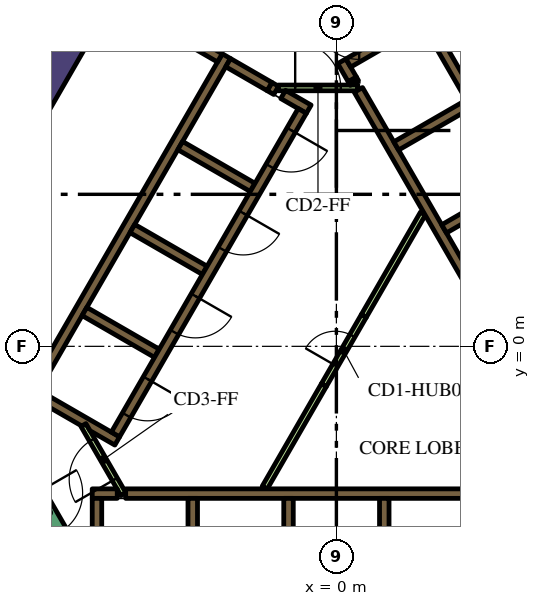
"""IFC4 building model, lengths in metres.
Left out: names, types, materials, properties, quantities, classifications, styles, units other than length and angle.
Written with IfcOpenShell. Run it as: python <this file> out.ifc"""

import sys

from ifc_helpers import new_model, si_unit, direction, frame, frame_2d, origin, place, context, subcontext, project, spatial, polyline, rectangle, outline, extrude, element, fill, save


model = new_model("IFC4")
c1 = context("Model", 3, precision=1e-05, world=origin(), true_north=direction((0.0, 1.0)))
c2 = subcontext(c1, "Body", "Model", "MODEL_VIEW")
j1 = project(units=[si_unit("LENGTHUNIT", "METRE"), si_unit("PLANEANGLEUNIT", "RADIAN")], contexts=[c1])
p1 = place(None, origin())
s1 = spatial("IfcSite", under=j1, at=p1, CompositionType="ELEMENT")
p2 = place(p1, origin())
s2 = spatial("IfcBuilding", under=s1, at=p2, CompositionType="ELEMENT")
p3 = place(p2, frame((0.0, 0.0, 162.6)))
s3 = spatial("IfcBuildingStorey", under=s2, at=p3, CompositionType="ELEMENT", Elevation=162.6)
p4 = place(p3, frame((8.279, 5.761, 0.0), z_axis=(0.0, 0.0, 1.0), x_axis=(-0.500010359015, 0.866019422922, 0.0)))
e1 = element("IfcWall", 1, at=p4, inside=s3, PredefinedType="SOLIDWALL", context=c2, shape_type="SweptSolid", body=[
    extrude(rectangle(XDim=12.528, YDim=0.8, at=frame_2d((6.264, 0.0))), origin(), (0.0, 0.0, 1.0), 4.2),
])
p5 = place(p3, frame((-12.668, -1.842, 0.0), z_axis=(0.0, 0.0, 1.0), x_axis=(0.500003640647, 0.866023301845, 0.0)))
e2 = element("IfcWall", 2, at=p5, inside=s3, PredefinedType="SOLIDWALL", context=c2, shape_type="SweptSolid", body=[
    extrude(rectangle(XDim=15.858, YDim=0.8, at=frame_2d((7.929, 0.0))), origin(), (0.0, 0.0, 1.0), 4.2),
])
p6 = place(p3, frame((-5.545, -3.875, 0.0), z_axis=(0.0, 0.0, 1.0), x_axis=(1.0, 0.0, 0.0)))
e3 = element("IfcWall", 3, at=p6, inside=s3, PredefinedType="SOLIDWALL", context=c2, shape_type="SweptSolid", body=[
    extrude(rectangle(XDim=11.97, YDim=0.25, at=frame_2d((5.985, 0.0))), origin(), (0.0, 0.0, 1.0), 4.2),
])
p7 = place(p3, frame((-6.425, -3.875, 0.0), z_axis=(0.0, 0.0, 1.0), x_axis=(1.0, 0.0, 0.0)))
e4 = element("IfcWall", 4, at=p7, inside=s3, PredefinedType="SOLIDWALL", context=c2, shape_type="SweptSolid", body=[
    extrude(rectangle(XDim=0.658, YDim=0.25, at=frame_2d((0.329, 0.0))), origin(), (0.0, 0.0, 1.0), 4.2),
])
for number, where, z_axis, x_axis in (
    (5, (1.26, -4.0, 0.0), (0.0, 0.0, 1.0), (0.0, -1.0, 0.0)),
    (6, (-1.26, -4.0, 0.0), (0.0, 0.0, 1.0), (0.0, -1.0, 0.0)),
    (7, (-3.78, -4.0, 0.0), (0.0, 0.0, 1.0), (0.0, -1.0, 0.0)),
):
    element("IfcWall", number, at=place(p3, frame(where, z_axis=z_axis, x_axis=x_axis)), inside=s3, PredefinedType="SOLIDWALL", context=c2, shape_type="SweptSolid", body=[
        extrude(rectangle(XDim=2.2, YDim=0.25, at=frame_2d((1.1, 0.0))), origin(), (0.0, 0.0, 1.0), 4.2),
    ])
p8 = place(p3, frame((-6.3, -7.125, 0.0), z_axis=(0.0, 0.0, 1.0), x_axis=(0.0, 1.0, 0.0)))
e8 = element("IfcWall", 8, at=p8, inside=s3, PredefinedType="SOLIDWALL", context=c2, shape_type="SweptSolid", body=[
    extrude(rectangle(XDim=3.125, YDim=0.25, at=frame_2d((1.562, 0.0))), origin(), (0.0, 0.0, 1.0), 4.2),
])
p9 = place(p3, frame((0.473, 6.93, 0.0), z_axis=(0.0, 0.0, 1.0), x_axis=(-0.49972245349, 0.866185586049, 0.0)))
e9 = element("IfcWall", 9, at=p9, inside=s3, PredefinedType="SOLIDWALL", context=c2, shape_type="SweptSolid", body=[
    extrude(rectangle(XDim=0.11, YDim=0.25, at=frame_2d((0.055, 0.0))), origin(), (0.0, 0.0, 1.0), 4.2),
])
p10 = place(p3, frame((6.568, -3.627, 0.0), z_axis=(0.0, 0.0, 1.0), x_axis=(-0.499999455981, 0.866025717874, 0.0)))
e10 = element("IfcWall", 10, at=p10, inside=s3, PredefinedType="SOLIDWALL", context=c2, shape_type="SweptSolid", body=[
    extrude(rectangle(XDim=11.978, YDim=0.25, at=frame_2d((5.989, 0.0))), origin(), (0.0, 0.0, 1.0), 4.2),
])
p11 = place(p3, frame((0.417, 7.027, 0.0), z_axis=(0.0, 0.0, 1.0), x_axis=(-0.500210807569, 0.865903659763, 0.0)))
e11 = element("IfcWall", 11, at=p11, inside=s3, PredefinedType="SOLIDWALL", context=c2, shape_type="SweptSolid", body=[
    extrude(rectangle(XDim=0.548, YDim=0.25, at=frame_2d((0.274, 0.0))), origin(), (0.0, 0.0, 1.0), 4.2),
])
p12 = place(p3, frame((3.1, 9.064, 0.0), z_axis=(0.0, 0.0, 1.0), x_axis=(-0.866030133475, -0.499991807846, 0.0)))
e12 = element("IfcWall", 12, at=p12, inside=s3, PredefinedType="SOLIDWALL", context=c2, shape_type="SweptSolid", body=[
    extrude(rectangle(XDim=3.217, YDim=0.25, at=frame_2d((1.608, 0.0))), origin(), (0.0, 0.0, 1.0), 4.2),
])
p13 = place(p3, frame((1.574, 5.274, 0.0), z_axis=(0.0, 0.0, 1.0), x_axis=(0.866028486751, 0.499994660107, 0.0)))
e13 = element("IfcWall", 13, at=p13, inside=s3, PredefinedType="SOLIDWALL", context=c2, shape_type="SweptSolid", body=[
    extrude(rectangle(XDim=2.2, YDim=0.25, at=frame_2d((1.1, 0.0))), origin(), (0.0, 0.0, 1.0), 4.2),
])
p14 = place(p3, frame((2.834, 3.091, 0.0), z_axis=(0.0, 0.0, 1.0), x_axis=(0.866008176907, 0.50002983664, 0.0)))
e14 = element("IfcWall", 14, at=p14, inside=s3, PredefinedType="SOLIDWALL", context=c2, shape_type="SweptSolid", body=[
    extrude(rectangle(XDim=2.2, YDim=0.25, at=frame_2d((1.1, 0.0))), origin(), (0.0, 0.0, 1.0), 4.2),
])
p15 = place(p3, frame((-8.06, -1.311, 0.0), z_axis=(0.0, 0.0, 1.0), x_axis=(0.50000273126, 0.866023826885, 0.0)))
e15 = element("IfcWall", 15, at=p15, inside=s3, PredefinedType="SOLIDWALL", context=c2, shape_type="SweptSolid", body=[
    extrude(rectangle(XDim=10.33, YDim=0.25, at=frame_2d((5.165, 0.0))), origin(), (0.0, 0.0, 1.0), 4.2),
])
p16 = place(p3, frame((-1.758, 6.835, 0.0), z_axis=(0.0, 0.0, 1.0), x_axis=(0.865982457891, -0.500074377092, 0.0)))
e16 = element("IfcWall", 16, at=p16, inside=s3, PredefinedType="SOLIDWALL", context=c2, shape_type="SweptSolid", body=[
    extrude(rectangle(XDim=0.2, YDim=0.25, at=frame_2d((0.1, 0.0))), origin(), (0.0, 0.0, 1.0), 4.2),
])
p17 = place(p3, frame((-1.76, 6.836, 0.0), z_axis=(0.0, 0.0, 1.0), x_axis=(-0.865952863304, 0.500125622755, 0.0)))
e17 = element("IfcWall", 17, at=p17, inside=s3, PredefinedType="SOLIDWALL", context=c2, shape_type="SweptSolid", body=[
    extrude(rectangle(XDim=1.258, YDim=0.25, at=frame_2d((0.629, 0.0))), origin(), (0.0, 0.0, 1.0), 4.2),
])
p18 = place(p3, frame((-0.728, 6.24, 0.0), z_axis=(0.0, 0.0, 1.0), x_axis=(-0.865955664968, 0.500120771724, 0.0)))
e18 = element("IfcWall", 18, at=p18, inside=s3, PredefinedType="SOLIDWALL", context=c2, shape_type="SweptSolid", body=[
    extrude(rectangle(XDim=0.778, YDim=0.25, at=frame_2d((0.389, 0.0))), origin(), (0.0, 0.0, 1.0), 4.2),
])
for number, where, z_axis, x_axis in (
    (19, (-2.204, 4.182, 0.0), (0.0, 0.0, 1.0), (-0.866, 0.5, 0.0)),
    (20, (-5.369, 3.1, 0.0), (0.0, 0.0, 1.0), (0.866, -0.5, 0.0)),
    (21, (-4.724, -0.182, 0.0), (0.0, 0.0, 1.0), (-0.866, 0.5, 0.0)),
):
    element("IfcWall", number, at=place(p3, frame(where, z_axis=z_axis, x_axis=x_axis)), inside=s3, PredefinedType="SOLIDWALL", context=c2, shape_type="SweptSolid", body=[
        extrude(rectangle(XDim=2.2, YDim=0.25, at=frame_2d((1.1, 0.0))), origin(), (0.0, 0.0, 1.0), 4.2),
    ])
p19 = place(p3, origin())
e22 = element("IfcWall", 22, at=p19, inside=s3, PredefinedType="SOLIDWALL", context=c2, shape_type="SweptSolid", body=[
    extrude(outline(polyline([(-5.922, -2.257), (-5.922, -2.257), (-5.705, -2.382), (-5.83, -2.598), (-6.483, -2.221), (-6.591, -2.033), (-6.591, -2.033), (-6.7, -2.096), (-7.952, -1.373), (-7.827, -1.156), (-5.922, -2.257)])), origin(), (0.0, 0.0, 1.0), 4.2),
])
p20 = place(p3, frame((-3.066, 7.59, 0.0), z_axis=(0.0, 0.0, 1.0), x_axis=(-0.866081358704, 0.49990307071, 0.0)))
e23 = element("IfcWall", 23, at=p20, inside=s3, PredefinedType="SOLIDWALL", context=c2, shape_type="SweptSolid", body=[
    extrude(rectangle(XDim=0.858, YDim=0.25, at=frame_2d((0.429, 0.0))), origin(), (0.0, 0.0, 1.0), 4.2),
])
p21 = place(p3, frame((-1.887, -3.718, 0.0), z_axis=(0.0, 0.0, 1.0), x_axis=(0.500043732237, 0.866000153493, 0.0)))
e24 = element("IfcWall", 24, at=p21, inside=s3, PredefinedType="PARTITIONING", context=c2, shape_type="SweptSolid", body=[
    extrude(rectangle(XDim=3.114, YDim=0.15, at=frame_2d((1.557, 0.0))), origin(), (0.0, 0.0, 1.0), 3.15),
])
p22 = place(p3, frame((0.72, 0.797, 0.0), z_axis=(0.0, 0.0, 1.0), x_axis=(0.499984921984, 0.866034108906, 0.0)))
e25 = element("IfcWall", 25, at=p22, inside=s3, PredefinedType="PARTITIONING", context=c2, shape_type="SweptSolid", body=[
    extrude(rectangle(XDim=3.113, YDim=0.15, at=frame_2d((1.557, 0.0))), origin(), (0.0, 0.0, 1.0), 3.15),
])
p23 = place(p3, frame((8.565, -2.185, 0.0), z_axis=(0.0, 0.0, 1.0), x_axis=(-0.499997954832, 0.866026584559, 0.0)))
e26 = element("IfcWall", 26, at=p23, inside=s3, PredefinedType="SOLIDWALL", context=c2, shape_type="SweptSolid", body=[
    extrude(rectangle(XDim=12.35, YDim=0.25, at=frame_2d((6.175, 0.0))), origin(), (0.0, 0.0, 1.0), 4.2),
])
p24 = place(p23, frame((0.585, 0.0, 0.0)))
e27 = element("IfcOpeningElement", 27, at=p24, cuts=e26, PredefinedType="OPENING", context=c2, shape_type="SweptSolid", body=[
    extrude(rectangle(XDim=1.1, YDim=2.1, at=frame_2d((0.55, 1.05))), frame((0.0, 0.135, 0.0), z_axis=(0.0, -1.0, 0.0), x_axis=(1.0, 0.0, 0.0)), (0.0, 0.0, 1.0), 0.27),
])
p25 = place(p3, frame((-0.898, 6.194, 0.0), z_axis=(0.0, 0.0, 1.0), x_axis=(-0.499996202215, -0.866027596426, 0.0)))
e28 = element("IfcWall", 28, at=p25, inside=s3, PredefinedType="SOLIDWALL", context=c2, shape_type="SweptSolid", body=[
    extrude(rectangle(XDim=9.83, YDim=0.25, at=frame_2d((4.915, 0.0))), origin(), (0.0, 0.0, 1.0), 4.2),
])
p26 = place(p25, frame((0.585, 0.0, 0.0)))
e29 = element("IfcOpeningElement", 29, at=p26, cuts=e28, PredefinedType="OPENING", context=c2, shape_type="SweptSolid", body=[
    extrude(rectangle(XDim=1.1, YDim=2.1, at=frame_2d((0.55, 1.05))), frame((0.0, 0.135, 0.0), z_axis=(0.0, -1.0, 0.0), x_axis=(1.0, 0.0, 0.0)), (0.0, 0.0, 1.0), 0.27),
])
p27 = place(p25, frame((3.105, 0.0, 0.0)))
e30 = element("IfcOpeningElement", 30, at=p27, cuts=e28, PredefinedType="OPENING", context=c2, shape_type="SweptSolid", body=[
    extrude(rectangle(XDim=1.1, YDim=2.1, at=frame_2d((0.55, 1.05))), frame((0.0, 0.135, 0.0), z_axis=(0.0, -1.0, 0.0), x_axis=(1.0, 0.0, 0.0)), (0.0, 0.0, 1.0), 0.27),
])
p28 = place(p25, frame((5.625, 0.0, 0.0)))
e31 = element("IfcOpeningElement", 31, at=p28, cuts=e28, PredefinedType="OPENING", context=c2, shape_type="SweptSolid", body=[
    extrude(rectangle(XDim=1.1, YDim=2.1, at=frame_2d((0.55, 1.05))), frame((0.0, 0.135, 0.0), z_axis=(0.0, -1.0, 0.0), x_axis=(1.0, 0.0, 0.0)), (0.0, 0.0, 1.0), 0.27),
])
p29 = place(p25, frame((8.145, 0.0, 0.0)))
e32 = element("IfcOpeningElement", 32, at=p29, cuts=e28, PredefinedType="OPENING", context=c2, shape_type="SweptSolid", body=[
    extrude(rectangle(XDim=1.1, YDim=2.1, at=frame_2d((0.55, 1.05))), frame((0.0, 0.135, 0.0), z_axis=(0.0, -1.0, 0.0), x_axis=(1.0, 0.0, 0.0)), (0.0, 0.0, 1.0), 0.27),
])
p30 = place(p3, frame((-8.103, -3.466, 0.0), z_axis=(0.0, 0.0, 1.0), x_axis=(0.500078061341, -0.865980330357, 0.0)))
e33 = element("IfcWall", 33, at=p30, inside=s3, PredefinedType="SOLIDWALL", context=c2, shape_type="SweptSolid", body=[
    extrude(rectangle(XDim=2.1, YDim=0.4, at=frame_2d((1.05, 0.0))), origin(), (0.0, 0.0, 1.0), 4.2),
])
p31 = place(p30, frame((0.45, 0.0, 0.0)))
e34 = element("IfcOpeningElement", 34, at=p31, cuts=e33, PredefinedType="OPENING", context=c2, shape_type="SweptSolid", body=[
    extrude(rectangle(XDim=1.2, YDim=2.1, at=frame_2d((0.6, 1.05))), frame((0.0, 0.21, 0.0), z_axis=(0.0, -1.0, 0.0), x_axis=(1.0, 0.0, 0.0)), (0.0, 0.0, 1.0), 0.42),
])
p32 = place(p3, frame((-0.33, -1.022, 0.0), z_axis=(0.0, 0.0, 1.0), x_axis=(0.500027713859, 0.866009402589, 0.0)))
e35 = element("IfcWall", 35, at=p32, inside=s3, PredefinedType="PARTITIONING", context=c2, shape_type="SweptSolid", body=[
    extrude(rectangle(XDim=2.1, YDim=0.15, at=frame_2d((1.05, 0.0))), origin(), (0.0, 0.0, 1.0), 3.15),
])
p33 = place(p32, frame((0.6, 0.0, 0.0)))
e36 = element("IfcOpeningElement", 36, at=p33, cuts=e35, PredefinedType="OPENING", context=c2, shape_type="SweptSolid", body=[
    extrude(rectangle(XDim=0.9, YDim=2.1, at=frame_2d((0.45, 1.05))), frame((0.0, 0.085, 0.0), z_axis=(0.0, -1.0, 0.0), x_axis=(1.0, 0.0, 0.0)), (0.0, 0.0, 1.0), 0.17),
])
p34 = place(p3, frame((-1.534, 6.8, 0.0), z_axis=(0.0, 0.0, 1.0), x_axis=(1.0, 0.0, 0.0)))
e37 = element("IfcWall", 37, at=p34, inside=s3, PredefinedType="PARTITIONING", context=c2, shape_type="SweptSolid", body=[
    extrude(rectangle(XDim=2.1, YDim=0.15, at=frame_2d((1.05, 0.0))), origin(), (0.0, 0.0, 1.0), 3.15),
])
p35 = place(p34, frame((0.45, 0.0, 0.0)))
e38 = element("IfcOpeningElement", 38, at=p35, cuts=e37, PredefinedType="OPENING", context=c2, shape_type="SweptSolid", body=[
    extrude(rectangle(XDim=1.2, YDim=2.1, at=frame_2d((0.6, 1.05))), frame((0.0, 0.085, 0.0), z_axis=(0.0, -1.0, 0.0), x_axis=(1.0, 0.0, 0.0)), (0.0, 0.0, 1.0), 0.17),
])
p36 = place(p3, frame((-5.606, -3.89, 0.0), z_axis=(0.0, 0.0, 1.0), x_axis=(-0.500027713859, 0.866009402589, 0.0)))
e39 = element("IfcWall", 39, at=p36, inside=s3, PredefinedType="PARTITIONING", context=c2, shape_type="SweptSolid", body=[
    extrude(rectangle(XDim=2.1, YDim=0.15, at=frame_2d((1.05, 0.0))), origin(), (0.0, 0.0, 1.0), 3.15),
])
p37 = place(p36, frame((0.45, 0.0, 0.0)))
e40 = element("IfcOpeningElement", 40, at=p37, cuts=e39, PredefinedType="OPENING", context=c2, shape_type="SweptSolid", body=[
    extrude(rectangle(XDim=1.2, YDim=2.1, at=frame_2d((0.6, 1.05))), frame((0.0, 0.085, 0.0), z_axis=(0.0, -1.0, 0.0), x_axis=(1.0, 0.0, 0.0)), (0.0, 0.0, 1.0), 0.17),
])
p38 = place(p26, origin())
e41 = element("IfcDoor", 41, at=p38, inside=s3, OperationType="DOUBLE_DOOR_SLIDING", PredefinedType="DOOR", context=c2, shape_type="SweptSolid", body=[
    extrude(rectangle(XDim=1.1, YDim=2.1, at=frame_2d((0.55, 1.05))), frame((0.0, 0.025, 0.0), z_axis=(0.0, -1.0, 0.0), x_axis=(1.0, 0.0, 0.0)), (0.0, 0.0, 1.0), 0.05),
])
fill(e29, e41)
p39 = place(p27, origin())
e42 = element("IfcDoor", 42, at=p39, inside=s3, OperationType="DOUBLE_DOOR_SLIDING", PredefinedType="DOOR", context=c2, shape_type="SweptSolid", body=[
    extrude(rectangle(XDim=1.1, YDim=2.1, at=frame_2d((0.55, 1.05))), frame((0.0, 0.025, 0.0), z_axis=(0.0, -1.0, 0.0), x_axis=(1.0, 0.0, 0.0)), (0.0, 0.0, 1.0), 0.05),
])
fill(e30, e42)
p40 = place(p28, origin())
e43 = element("IfcDoor", 43, at=p40, inside=s3, OperationType="DOUBLE_DOOR_SLIDING", PredefinedType="DOOR", context=c2, shape_type="SweptSolid", body=[
    extrude(rectangle(XDim=1.1, YDim=2.1, at=frame_2d((0.55, 1.05))), frame((0.0, 0.025, 0.0), z_axis=(0.0, -1.0, 0.0), x_axis=(1.0, 0.0, 0.0)), (0.0, 0.0, 1.0), 0.05),
])
fill(e31, e43)
p41 = place(p29, origin())
e44 = element("IfcDoor", 44, at=p41, inside=s3, OperationType="DOUBLE_DOOR_SLIDING", PredefinedType="DOOR", context=c2, shape_type="SweptSolid", body=[
    extrude(rectangle(XDim=1.1, YDim=2.1, at=frame_2d((0.55, 1.05))), frame((0.0, 0.025, 0.0), z_axis=(0.0, -1.0, 0.0), x_axis=(1.0, 0.0, 0.0)), (0.0, 0.0, 1.0), 0.05),
])
fill(e32, e44)
p42 = place(p31, origin())
e45 = element("IfcDoor", 45, at=p42, inside=s3, OperationType="SINGLE_SWING_LEFT", PredefinedType="DOOR", context=c2, shape_type="SweptSolid", body=[
    extrude(rectangle(XDim=1.2, YDim=2.1, at=frame_2d((0.6, 1.05))), frame((0.0, 0.025, 0.0), z_axis=(0.0, -1.0, 0.0), x_axis=(1.0, 0.0, 0.0)), (0.0, 0.0, 1.0), 0.05),
])
fill(e34, e45)
p43 = place(p33, origin())
e46 = element("IfcDoor", 46, at=p43, inside=s3, OperationType="SINGLE_SWING_LEFT", PredefinedType="DOOR", context=c2, shape_type="SweptSolid", body=[
    extrude(rectangle(XDim=0.9, YDim=2.1, at=frame_2d((0.45, 1.05))), frame((0.0, 0.025, 0.0), z_axis=(0.0, -1.0, 0.0), x_axis=(1.0, 0.0, 0.0)), (0.0, 0.0, 1.0), 0.05),
])
fill(e36, e46)
p44 = place(p35, origin())
e47 = element("IfcDoor", 47, at=p44, inside=s3, OperationType="SINGLE_SWING_LEFT", PredefinedType="DOOR", context=c2, shape_type="SweptSolid", body=[
    extrude(rectangle(XDim=1.2, YDim=2.1, at=frame_2d((0.6, 1.05))), frame((0.0, 0.025, 0.0), z_axis=(0.0, -1.0, 0.0), x_axis=(1.0, 0.0, 0.0)), (0.0, 0.0, 1.0), 0.05),
])
fill(e38, e47)
p45 = place(p37, origin())
e48 = element("IfcDoor", 48, at=p45, inside=s3, OperationType="SINGLE_SWING_LEFT", PredefinedType="DOOR", context=c2, shape_type="SweptSolid", body=[
    extrude(rectangle(XDim=1.2, YDim=2.1, at=frame_2d((0.6, 1.05))), frame((0.0, 0.025, 0.0), z_axis=(0.0, -1.0, 0.0), x_axis=(1.0, 0.0, 0.0)), (0.0, 0.0, 1.0), 0.05),
])
fill(e40, e48)
save(model, sys.argv[1])
